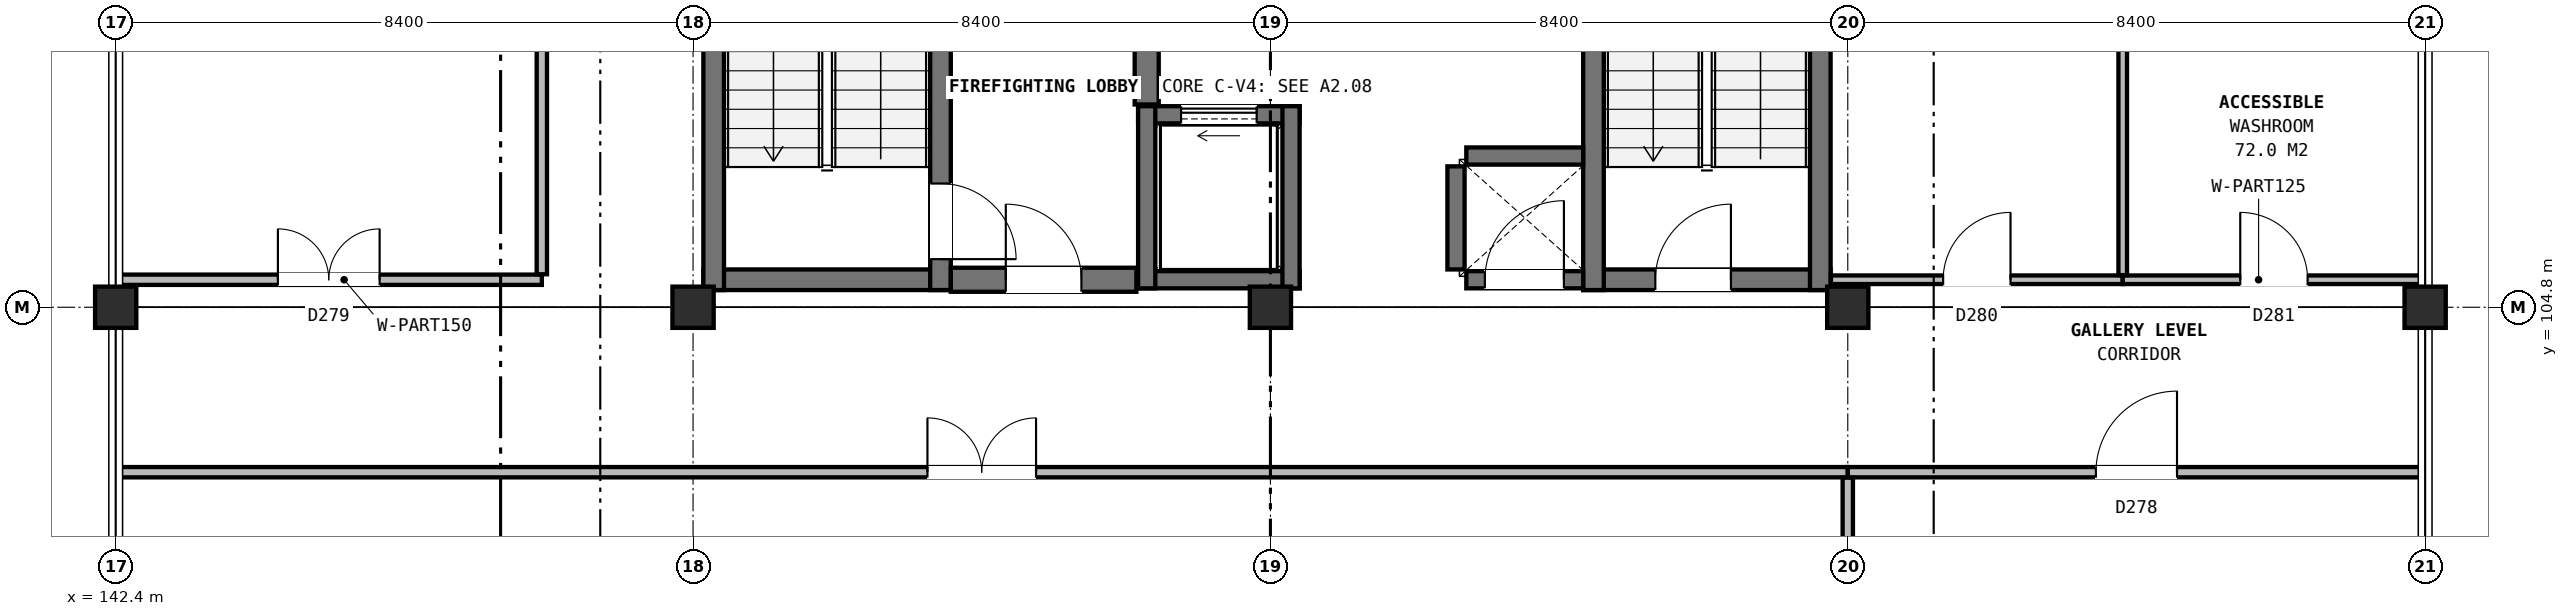
"""IFC4 building model, lengths in metres.
Left out: names, types, materials, properties, quantities, classifications, styles, units other than length and angle.
Written with IfcOpenShell. Run it as: python <this file> out.ifc"""

import sys

from ifc_helpers import new_model, si_unit, direction, frame, frame_2d, origin, origin_2d, place, context, subcontext, project, spatial, rectangle, extrude, element, fill, save


model = new_model("IFC4")
c1 = context("Model", 3, precision=1e-05, world=origin(), true_north=direction((0.0, 1.0)))
c2 = subcontext(c1, "Body", "Model", "MODEL_VIEW")
j1 = project(units=[si_unit("LENGTHUNIT", "METRE"), si_unit("PLANEANGLEUNIT", "RADIAN")], contexts=[c1])
p1 = place(None, origin())
s1 = spatial("IfcSite", under=j1, at=p1, CompositionType="ELEMENT")
p2 = place(p1, origin())
s2 = spatial("IfcBuilding", under=s1, at=p2, CompositionType="ELEMENT")
p3 = place(p2, frame((0.0, 0.0, 59.8)))
s3 = spatial("IfcBuildingStorey", under=s2, at=p3, CompositionType="ELEMENT", Elevation=59.8)
for number, where, z_axis, x_axis in (
    (1, (142.4, 104.8, 0.0), (0.0, 0.0, 1.0), (1.0, 0.0, 0.0)),
    (2, (150.8, 104.8, 0.0), (0.0, 0.0, 1.0), (1.0, 0.0, 0.0)),
    (3, (159.2, 104.8, 0.0), (0.0, 0.0, 1.0), (1.0, 0.0, 0.0)),
    (4, (167.6, 104.8, 0.0), (0.0, 0.0, 1.0), (1.0, 0.0, 0.0)),
    (5, (176.0, 104.8, 0.0), (0.0, 0.0, 1.0), (1.0, 0.0, 0.0)),
):
    element("IfcColumn", number, at=place(p3, frame(where, z_axis=z_axis, x_axis=x_axis)), inside=s3, PredefinedType="COLUMN", context=c2, shape_type="SweptSolid", body=[
        extrude(rectangle(XDim=0.6, YDim=0.6, at=origin_2d()), origin(), (0.0, 0.0, 1.0), 4.0),
    ])
p4 = place(p3, frame((150.95, 105.2, 0.0), z_axis=(0.0, 0.0, 1.0), x_axis=(1.0, 0.0, 0.0)))
e6 = element("IfcWall", 6, at=p4, inside=s3, PredefinedType="SHEAR", context=c2, shape_type="SweptSolid", body=[
    extrude(rectangle(XDim=3.6, YDim=0.3, at=frame_2d((1.8, 0.0))), origin(), (0.0, 0.0, 1.0), 4.0),
])
p5 = place(p3, frame((151.1, 105.05, 0.0), z_axis=(0.0, 0.0, 1.0), x_axis=(0.0, 1.0, 0.0)))
e7 = element("IfcWall", 7, at=p5, inside=s3, PredefinedType="SHEAR", context=c2, shape_type="SweptSolid", body=[
    extrude(rectangle(XDim=8.3, YDim=0.3, at=frame_2d((4.15, 0.0))), origin(), (0.0, 0.0, 1.0), 4.0),
])
p6 = place(p3, frame((154.4, 105.05, 0.0), z_axis=(0.0, 0.0, 1.0), x_axis=(0.0, 1.0, 0.0)))
e8 = element("IfcWall", 8, at=p6, inside=s3, PredefinedType="SHEAR", context=c2, shape_type="SweptSolid", body=[
    extrude(rectangle(XDim=8.3, YDim=0.3, at=frame_2d((4.15, 0.0))), origin(), (0.0, 0.0, 1.0), 4.0),
])
p7 = place(p6, frame((0.45, 0.0, 0.0)))
e9 = element("IfcOpeningElement", 9, at=p7, cuts=e8, PredefinedType="OPENING", context=c2, shape_type="SweptSolid", body=[
    extrude(rectangle(XDim=1.1, YDim=2.2, at=frame_2d((0.55, 1.1))), frame((0.0, 0.16, 0.0), z_axis=(0.0, -1.0, 0.0), x_axis=(1.0, 0.0, 0.0)), (0.0, 0.0, 1.0), 0.32),
])
p8 = place(p3, frame((163.75, 105.2, 0.0), z_axis=(0.0, 0.0, 1.0), x_axis=(1.0, 0.0, 0.0)))
e10 = element("IfcWall", 10, at=p8, inside=s3, PredefinedType="SHEAR", context=c2, shape_type="SweptSolid", body=[
    extrude(rectangle(XDim=3.6, YDim=0.3, at=frame_2d((1.8, 0.0))), origin(), (0.0, 0.0, 1.0), 4.0),
])
p9 = place(p8, frame((1.05, 0.0, 0.0)))
e11 = element("IfcOpeningElement", 11, at=p9, cuts=e10, PredefinedType="OPENING", context=c2, shape_type="SweptSolid", body=[
    extrude(rectangle(XDim=1.1, YDim=2.2, at=frame_2d((0.55, 1.1))), frame((0.0, 0.16, 0.0), z_axis=(0.0, -1.0, 0.0), x_axis=(1.0, 0.0, 0.0)), (0.0, 0.0, 1.0), 0.32),
])
for number, where, z_axis, x_axis in (
    (12, (163.9, 105.05, 0.0), (0.0, 0.0, 1.0), (0.0, 1.0, 0.0)),
    (13, (167.2, 105.05, 0.0), (0.0, 0.0, 1.0), (0.0, 1.0, 0.0)),
):
    element("IfcWall", number, at=place(p3, frame(where, z_axis=z_axis, x_axis=x_axis)), inside=s3, PredefinedType="SHEAR", context=c2, shape_type="SweptSolid", body=[
        extrude(rectangle(XDim=8.3, YDim=0.3, at=frame_2d((4.15, 0.0))), origin(), (0.0, 0.0, 1.0), 4.0),
    ])
p10 = place(p3, frame((157.275, 105.2, 0.0), z_axis=(0.0, 0.0, 1.0), x_axis=(1.0, 0.0, 0.0)))
e14 = element("IfcWall", 14, at=p10, inside=s3, PredefinedType="SOLIDWALL", context=c2, shape_type="SweptSolid", body=[
    extrude(rectangle(XDim=2.35, YDim=0.25, at=frame_2d((1.175, 0.0))), origin(), (0.0, 0.0, 1.0), 3.68),
])
p11 = place(p3, frame((157.275, 107.6, 0.0), z_axis=(0.0, 0.0, 1.0), x_axis=(1.0, 0.0, 0.0)))
e15 = element("IfcWall", 15, at=p11, inside=s3, PredefinedType="SOLIDWALL", context=c2, shape_type="SweptSolid", body=[
    extrude(rectangle(XDim=2.35, YDim=0.25, at=frame_2d((1.175, 0.0))), origin(), (0.0, 0.0, 1.0), 3.68),
])
p12 = place(p11, frame((0.625, 0.0, 0.0)))
e16 = element("IfcOpeningElement", 16, at=p12, cuts=e15, PredefinedType="OPENING", context=c2, shape_type="SweptSolid", body=[
    extrude(rectangle(XDim=1.1, YDim=2.2, at=frame_2d((0.55, 1.1))), frame((0.0, 0.135, 0.0), z_axis=(0.0, -1.0, 0.0), x_axis=(1.0, 0.0, 0.0)), (0.0, 0.0, 1.0), 0.27),
])
for number, where, z_axis, x_axis in (
    (17, (157.4, 105.075, 0.0), (0.0, 0.0, 1.0), (0.0, 1.0, 0.0)),
    (18, (159.5, 105.075, 0.0), (0.0, 0.0, 1.0), (0.0, 1.0, 0.0)),
):
    element("IfcWall", number, at=place(p3, frame(where, z_axis=z_axis, x_axis=x_axis)), inside=s3, PredefinedType="SOLIDWALL", context=c2, shape_type="SweptSolid", body=[
        extrude(rectangle(XDim=2.65, YDim=0.25, at=frame_2d((1.325, 0.0))), origin(), (0.0, 0.0, 1.0), 3.68),
    ])
p13 = place(p3, frame((157.4, 107.75, 0.0), z_axis=(0.0, 0.0, 1.0), x_axis=(0.0, 1.0, 0.0)))
e19 = element("IfcWall", 19, at=p13, inside=s3, PredefinedType="SHEAR", context=c2, shape_type="SweptSolid", body=[
    extrude(rectangle(XDim=2.9, YDim=0.35, at=frame_2d((1.45, 0.0))), origin(), (0.0, 0.0, 1.0), 3.68),
])
p14 = place(p3, frame((154.55, 105.2, 0.0), z_axis=(0.0, 0.0, 1.0), x_axis=(1.0, 0.0, 0.0)))
e20 = element("IfcWall", 20, at=p14, inside=s3, PredefinedType="SHEAR", context=c2, shape_type="SweptSolid", body=[
    extrude(rectangle(XDim=2.7, YDim=0.35, at=frame_2d((1.35, 0.0))), origin(), (0.0, 0.0, 1.0), 3.68),
])
p15 = place(p14, frame((0.8, 0.0, 0.0)))
e21 = element("IfcOpeningElement", 21, at=p15, cuts=e20, PredefinedType="OPENING", context=c2, shape_type="SweptSolid", body=[
    extrude(rectangle(XDim=1.1, YDim=2.2, at=frame_2d((0.55, 1.1))), frame((0.0, 0.185, 0.0), z_axis=(0.0, -1.0, 0.0), x_axis=(1.0, 0.0, 0.0)), (0.0, 0.0, 1.0), 0.37),
])
p16 = place(p3, frame((161.9, 105.35, 0.0), z_axis=(0.0, 0.0, 1.0), x_axis=(0.0, 1.0, 0.0)))
e22 = element("IfcWall", 22, at=p16, inside=s3, PredefinedType="SOLIDWALL", context=c2, shape_type="SweptSolid", body=[
    extrude(rectangle(XDim=1.5, YDim=0.25, at=frame_2d((0.75, 0.0))), origin(), (0.0, 0.0, 1.0), 3.68),
])
p17 = place(p3, frame((162.05, 107.0, 0.0), z_axis=(0.0, 0.0, 1.0), x_axis=(1.0, 0.0, 0.0)))
e23 = element("IfcWall", 23, at=p17, inside=s3, PredefinedType="SOLIDWALL", context=c2, shape_type="SweptSolid", body=[
    extrude(rectangle(XDim=1.7, YDim=0.25, at=frame_2d((0.85, 0.0))), origin(), (0.0, 0.0, 1.0), 3.68),
])
p18 = place(p3, frame((162.05, 105.2, 0.0), z_axis=(0.0, 0.0, 1.0), x_axis=(1.0, 0.0, 0.0)))
e24 = element("IfcWall", 24, at=p18, inside=s3, PredefinedType="SOLIDWALL", context=c2, shape_type="SweptSolid", body=[
    extrude(rectangle(XDim=1.7, YDim=0.25, at=frame_2d((0.85, 0.0))), origin(), (0.0, 0.0, 1.0), 3.68),
])
p19 = place(p18, frame((0.27, 0.0, 0.0)))
e25 = element("IfcOpeningElement", 25, at=p19, cuts=e24, PredefinedType="OPENING", context=c2, shape_type="SweptSolid", body=[
    extrude(rectangle(XDim=1.15, YDim=2.2, at=frame_2d((0.575, 1.1))), frame((0.0, 0.135, 0.0), z_axis=(0.0, -1.0, 0.0), x_axis=(1.0, 0.0, 0.0)), (0.0, 0.0, 1.0), 0.27),
])
p20 = place(p3, frame((142.4, 102.4, 0.0), z_axis=(0.0, 0.0, 1.0), x_axis=(1.0, 0.0, 0.0)))
e26 = element("IfcWall", 26, at=p20, inside=s3, PredefinedType="PARTITIONING", context=c2, shape_type="SweptSolid", body=[
    extrude(rectangle(XDim=25.2, YDim=0.15, at=frame_2d((12.6, 0.0))), origin(), (0.0, 0.0, 1.0), 3.665),
])
p21 = place(p20, frame((11.81, 0.0, 0.0)))
e27 = element("IfcOpeningElement", 27, at=p21, cuts=e26, PredefinedType="OPENING", context=c2, shape_type="SweptSolid", body=[
    extrude(rectangle(XDim=1.58, YDim=2.25, at=frame_2d((0.79, 1.125))), frame((0.0, 0.085, 0.0), z_axis=(0.0, -1.0, 0.0), x_axis=(1.0, 0.0, 0.0)), (0.0, 0.0, 1.0), 0.17),
])
p22 = place(p3, frame((167.6, 102.4, 0.0), z_axis=(0.0, 0.0, 1.0), x_axis=(1.0, 0.0, 0.0)))
e28 = element("IfcWall", 28, at=p22, inside=s3, PredefinedType="PARTITIONING", context=c2, shape_type="SweptSolid", body=[
    extrude(rectangle(XDim=8.4, YDim=0.15, at=frame_2d((4.2, 0.0))), origin(), (0.0, 0.0, 1.0), 3.665),
])
p23 = place(p22, frame((3.61, 0.0, 0.0)))
e29 = element("IfcOpeningElement", 29, at=p23, cuts=e28, PredefinedType="OPENING", context=c2, shape_type="SweptSolid", body=[
    extrude(rectangle(XDim=1.18, YDim=2.24, at=frame_2d((0.59, 1.12))), frame((0.0, 0.085, 0.0), z_axis=(0.0, -1.0, 0.0), x_axis=(1.0, 0.0, 0.0)), (0.0, 0.0, 1.0), 0.17),
])
p24 = place(p3, frame((142.4, 105.2, 0.0), z_axis=(0.0, 0.0, 1.0), x_axis=(1.0, 0.0, 0.0)))
e30 = element("IfcWall", 30, at=p24, inside=s3, PredefinedType="PARTITIONING", context=c2, shape_type="SweptSolid", body=[
    extrude(rectangle(XDim=6.2, YDim=0.15, at=frame_2d((3.1, 0.0))), origin(), (0.0, 0.0, 1.0), 3.245),
])
p25 = place(p24, frame((2.36, 0.0, 0.0)))
e31 = element("IfcOpeningElement", 31, at=p25, cuts=e30, PredefinedType="OPENING", context=c2, shape_type="SweptSolid", body=[
    extrude(rectangle(XDim=1.48, YDim=2.2, at=frame_2d((0.74, 1.1))), frame((0.0, 0.085, 0.0), z_axis=(0.0, -1.0, 0.0), x_axis=(1.0, 0.0, 0.0)), (0.0, 0.0, 1.0), 0.17),
])
p26 = place(p3, frame((167.355, 105.2, 0.0), z_axis=(0.0, 0.0, 1.0), x_axis=(1.0, 0.0, 0.0)))
e32 = element("IfcWall", 32, at=p26, inside=s3, PredefinedType="PARTITIONING", context=c2, shape_type="SweptSolid", body=[
    extrude(rectangle(XDim=4.245, YDim=0.125, at=frame_2d((2.123, 0.0))), origin(), (0.0, 0.0, 1.0), 3.245),
])
p27 = place(p26, frame((1.633, 0.0, 0.0)))
e33 = element("IfcOpeningElement", 33, at=p27, cuts=e32, PredefinedType="OPENING", context=c2, shape_type="SweptSolid", body=[
    extrude(rectangle(XDim=0.98, YDim=2.1, at=frame_2d((0.49, 1.05))), frame((0.0, 0.073, 0.0), z_axis=(0.0, -1.0, 0.0), x_axis=(1.0, 0.0, 0.0)), (0.0, 0.0, 1.0), 0.145),
])
p28 = place(p3, frame((171.6, 105.2, 0.0), z_axis=(0.0, 0.0, 1.0), x_axis=(1.0, 0.0, 0.0)))
e34 = element("IfcWall", 34, at=p28, inside=s3, PredefinedType="PARTITIONING", context=c2, shape_type="SweptSolid", body=[
    extrude(rectangle(XDim=4.4, YDim=0.125, at=frame_2d((2.2, 0.0))), origin(), (0.0, 0.0, 1.0), 3.245),
])
p29 = place(p28, frame((1.71, 0.0, 0.0)))
e35 = element("IfcOpeningElement", 35, at=p29, cuts=e34, PredefinedType="OPENING", context=c2, shape_type="SweptSolid", body=[
    extrude(rectangle(XDim=0.98, YDim=2.1, at=frame_2d((0.49, 1.05))), frame((0.0, 0.073, 0.0), z_axis=(0.0, -1.0, 0.0), x_axis=(1.0, 0.0, 0.0)), (0.0, 0.0, 1.0), 0.145),
])
p30 = place(p3, frame((148.6, 105.28, 0.0), z_axis=(0.0, 0.0, 1.0), x_axis=(0.0, 1.0, 0.0)))
e36 = element("IfcWall", 36, at=p30, inside=s3, PredefinedType="PARTITIONING", context=c2, shape_type="SweptSolid", body=[
    extrude(rectangle(XDim=14.12, YDim=0.15, at=frame_2d((7.06, 0.0))), origin(), (0.0, 0.0, 1.0), 3.665),
])
p31 = place(p3, frame((167.6, 87.5, 0.0), z_axis=(0.0, 0.0, 1.0), x_axis=(0.0, 1.0, 0.0)))
e37 = element("IfcWall", 37, at=p31, inside=s3, PredefinedType="PARTITIONING", context=c2, shape_type="SweptSolid", body=[
    extrude(rectangle(XDim=14.82, YDim=0.15, at=frame_2d((7.41, 0.0))), origin(), (0.0, 0.0, 1.0), 3.245),
])
p32 = place(p3, frame((171.6, 105.268, 0.0), z_axis=(0.0, 0.0, 1.0), x_axis=(0.0, 1.0, 0.0)))
e38 = element("IfcWall", 38, at=p32, inside=s3, PredefinedType="PARTITIONING", context=c2, shape_type="SweptSolid", body=[
    extrude(rectangle(XDim=17.132, YDim=0.125, at=frame_2d((8.566, 0.0))), origin(), (0.0, 0.0, 1.0), 3.665),
])
p33 = place(p7, frame((1.1, 0.0, 0.0), z_axis=(0.0, 0.0, 1.0), x_axis=(-1.0, 0.0, 0.0)))
e39 = element("IfcDoor", 39, at=p33, inside=s3, OperationType="SINGLE_SWING_LEFT", PredefinedType="DOOR", context=c2, shape_type="SweptSolid", body=[
    extrude(rectangle(XDim=1.1, YDim=2.2, at=frame_2d((0.55, 1.1))), frame((0.0, 0.025, 0.0), z_axis=(0.0, -1.0, 0.0), x_axis=(1.0, 0.0, 0.0)), (0.0, 0.0, 1.0), 0.05),
])
fill(e9, e39)
p34 = place(p9, origin())
e40 = element("IfcDoor", 40, at=p34, inside=s3, OperationType="SINGLE_SWING_RIGHT", PredefinedType="DOOR", context=c2, shape_type="SweptSolid", body=[
    extrude(rectangle(XDim=1.1, YDim=2.2, at=frame_2d((0.55, 1.1))), frame((0.0, 0.025, 0.0), z_axis=(0.0, -1.0, 0.0), x_axis=(1.0, 0.0, 0.0)), (0.0, 0.0, 1.0), 0.05),
])
fill(e11, e40)
p35 = place(p12, origin())
e41 = element("IfcDoor", 41, at=p35, inside=s3, OperationType="SLIDING_TO_LEFT", PredefinedType="DOOR", context=c2, shape_type="SweptSolid", body=[
    extrude(rectangle(XDim=1.1, YDim=2.2, at=frame_2d((0.55, 1.1))), frame((0.0, 0.025, 0.0), z_axis=(0.0, -1.0, 0.0), x_axis=(1.0, 0.0, 0.0)), (0.0, 0.0, 1.0), 0.05),
])
fill(e16, e41)
p36 = place(p15, origin())
e42 = element("IfcDoor", 42, at=p36, inside=s3, OperationType="SINGLE_SWING_LEFT", PredefinedType="DOOR", context=c2, shape_type="SweptSolid", body=[
    extrude(rectangle(XDim=1.1, YDim=2.2, at=frame_2d((0.55, 1.1))), frame((0.0, 0.025, 0.0), z_axis=(0.0, -1.0, 0.0), x_axis=(1.0, 0.0, 0.0)), (0.0, 0.0, 1.0), 0.05),
])
fill(e21, e42)
p37 = place(p19, origin())
e43 = element("IfcDoor", 43, at=p37, inside=s3, OperationType="SINGLE_SWING_RIGHT", PredefinedType="DOOR", context=c2, shape_type="SweptSolid", body=[
    extrude(rectangle(XDim=1.15, YDim=2.2, at=frame_2d((0.575, 1.1))), frame((0.0, 0.025, 0.0), z_axis=(0.0, -1.0, 0.0), x_axis=(1.0, 0.0, 0.0)), (0.0, 0.0, 1.0), 0.05),
])
fill(e25, e43)
p38 = place(p21, origin())
e44 = element("IfcDoor", 44, at=p38, inside=s3, OperationType="DOUBLE_DOOR_SINGLE_SWING", PredefinedType="DOOR", context=c2, shape_type="SweptSolid", body=[
    extrude(rectangle(XDim=1.58, YDim=2.25, at=frame_2d((0.79, 1.125))), frame((0.0, 0.025, 0.0), z_axis=(0.0, -1.0, 0.0), x_axis=(1.0, 0.0, 0.0)), (0.0, 0.0, 1.0), 0.05),
])
fill(e27, e44)
p39 = place(p23, origin())
e45 = element("IfcDoor", 45, at=p39, inside=s3, OperationType="SINGLE_SWING_RIGHT", PredefinedType="DOOR", context=c2, shape_type="SweptSolid", body=[
    extrude(rectangle(XDim=1.18, YDim=2.24, at=frame_2d((0.59, 1.12))), frame((0.0, 0.025, 0.0), z_axis=(0.0, -1.0, 0.0), x_axis=(1.0, 0.0, 0.0)), (0.0, 0.0, 1.0), 0.05),
])
fill(e29, e45)
p40 = place(p25, origin())
e46 = element("IfcDoor", 46, at=p40, inside=s3, OperationType="DOUBLE_DOOR_SINGLE_SWING", PredefinedType="DOOR", context=c2, shape_type="SweptSolid", body=[
    extrude(rectangle(XDim=1.48, YDim=2.2, at=frame_2d((0.74, 1.1))), frame((0.0, 0.025, 0.0), z_axis=(0.0, -1.0, 0.0), x_axis=(1.0, 0.0, 0.0)), (0.0, 0.0, 1.0), 0.05),
])
fill(e31, e46)
p41 = place(p27, origin())
e47 = element("IfcDoor", 47, at=p41, inside=s3, OperationType="SINGLE_SWING_RIGHT", PredefinedType="DOOR", context=c2, shape_type="SweptSolid", body=[
    extrude(rectangle(XDim=0.98, YDim=2.1, at=frame_2d((0.49, 1.05))), frame((0.0, 0.025, 0.0), z_axis=(0.0, -1.0, 0.0), x_axis=(1.0, 0.0, 0.0)), (0.0, 0.0, 1.0), 0.05),
])
fill(e33, e47)
p42 = place(p29, origin())
e48 = element("IfcDoor", 48, at=p42, inside=s3, OperationType="SINGLE_SWING_LEFT", PredefinedType="DOOR", context=c2, shape_type="SweptSolid", body=[
    extrude(rectangle(XDim=0.98, YDim=2.1, at=frame_2d((0.49, 1.05))), frame((0.0, 0.025, 0.0), z_axis=(0.0, -1.0, 0.0), x_axis=(1.0, 0.0, 0.0)), (0.0, 0.0, 1.0), 0.05),
])
fill(e35, e48)
save(model, sys.argv[1])
